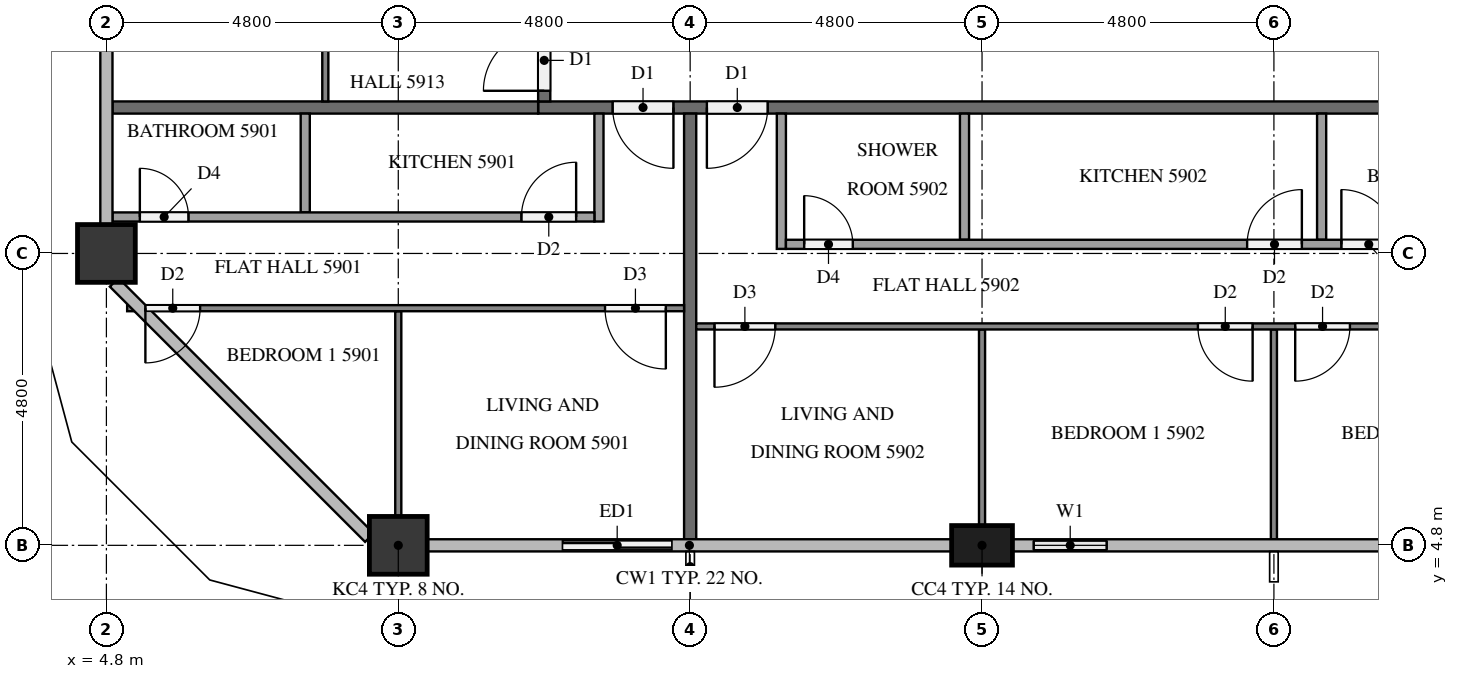
"""IFC4 building model, lengths in metres.
Left out: names, types, materials, properties, quantities, classifications, styles, units other than length and angle.
Written with IfcOpenShell. Run it as: python <this file> out.ifc"""

import sys

from ifc_helpers import new_model, si_unit, direction, frame, frame_2d, origin, origin_2d, place, context, subcontext, project, spatial, rectangle, extrude, element, fill, save


model = new_model("IFC4")
c1 = context("Model", 3, precision=1e-05, world=origin(), true_north=direction((0.0, 1.0)))
c2 = subcontext(c1, "Body", "Model", "MODEL_VIEW")
j1 = project(units=[si_unit("LENGTHUNIT", "METRE"), si_unit("PLANEANGLEUNIT", "RADIAN")], contexts=[c1])
p1 = place(None, origin())
s1 = spatial("IfcSite", under=j1, at=p1, CompositionType="ELEMENT")
p2 = place(p1, origin())
s2 = spatial("IfcBuilding", under=s1, at=p2, CompositionType="ELEMENT")
p3 = place(p2, frame((0.0, 0.0, 226.3)))
s3 = spatial("IfcBuildingStorey", under=s2, at=p3, CompositionType="ELEMENT", Elevation=226.3)
p4 = place(p3, frame((9.6, 4.8, 0.0), z_axis=(0.0, 0.0, 1.0), x_axis=(1.0, 0.0, 0.0)))
e1 = element("IfcColumn", 1, at=p4, inside=s3, PredefinedType="COLUMN", context=c2, shape_type="SweptSolid", body=[
    extrude(rectangle(XDim=0.95, YDim=0.95, at=origin_2d()), origin(), (0.0, 0.0, 1.0), 3.2),
])
p5 = place(p3, frame((19.2, 4.8, 0.0), z_axis=(0.0, 0.0, 1.0), x_axis=(1.0, 0.0, 0.0)))
e2 = element("IfcColumn", 2, at=p5, inside=s3, PredefinedType="COLUMN", context=c2, shape_type="SweptSolid", body=[
    extrude(rectangle(XDim=1.0, YDim=0.65, at=origin_2d()), origin(), (0.0, 0.0, 1.0), 3.2),
])
p6 = place(p3, frame((4.8, 9.6, 0.0), z_axis=(0.0, 0.0, 1.0), x_axis=(1.0, 0.0, 0.0)))
e3 = element("IfcColumn", 3, at=p6, inside=s3, PredefinedType="COLUMN", context=c2, shape_type="SweptSolid", body=[
    extrude(rectangle(XDim=0.95, YDim=0.95, at=origin_2d()), origin(), (0.0, 0.0, 1.0), 3.2),
])
p7 = place(p3, frame((12.0, 4.8, 0.0), z_axis=(0.0, 0.0, 1.0), x_axis=(1.0, 0.0, 0.0)))
e4 = element("IfcWall", 4, at=p7, inside=s3, PredefinedType="SOLIDWALL", context=c2, shape_type="SweptSolid", body=[
    extrude(rectangle(XDim=2.4, YDim=0.15, at=frame_2d((1.2, 0.0))), origin(), (0.0, 0.0, 1.0), 3.2),
])
p8 = place(p7, frame((0.3, 0.0, 0.0)))
e5 = element("IfcOpeningElement", 5, at=p8, cuts=e4, PredefinedType="OPENING", context=c2, shape_type="SweptSolid", body=[
    extrude(rectangle(XDim=1.8, YDim=2.4, at=frame_2d((0.9, 1.2))), frame((0.0, 0.085, 0.0), z_axis=(0.0, -1.0, 0.0), x_axis=(1.0, 0.0, 0.0)), (0.0, 0.0, 1.0), 0.17),
])
p9 = place(p3, frame((19.7, 4.8, 0.0), z_axis=(0.0, 0.0, 1.0), x_axis=(1.0, 0.0, 0.0)))
e6 = element("IfcWall", 6, at=p9, inside=s3, PredefinedType="SOLIDWALL", context=c2, shape_type="SweptSolid", body=[
    extrude(rectangle(XDim=1.9, YDim=0.15, at=frame_2d((0.95, 0.0))), origin(), (0.0, 0.0, 1.0), 3.2),
])
p10 = place(p9, frame((0.35, 0.0, 0.9)))
e7 = element("IfcOpeningElement", 7, at=p10, cuts=e6, PredefinedType="OPENING", context=c2, shape_type="SweptSolid", body=[
    extrude(rectangle(XDim=1.2, YDim=1.4, at=frame_2d((0.6, 0.7))), frame((0.0, 0.085, 0.0), z_axis=(0.0, -1.0, 0.0), x_axis=(1.0, 0.0, 0.0)), (0.0, 0.0, 1.0), 0.17),
])
p11 = place(p3, frame((50.5, 12.0, 0.0), z_axis=(0.0, 0.0, 1.0), x_axis=(-1.0, 0.0, 0.0)))
e8 = element("IfcWall", 8, at=p11, inside=s3, PredefinedType="PARTITIONING", context=c2, shape_type="SweptSolid", body=[
    extrude(rectangle(XDim=38.6, YDim=0.2, at=frame_2d((19.3, 0.0))), origin(), (0.0, 0.0, 1.0), 3.2),
])
p12 = place(p11, frame((36.375, 0.0, 0.0)))
e9 = element("IfcOpeningElement", 9, at=p12, cuts=e8, PredefinedType="OPENING", context=c2, shape_type="SweptSolid", body=[
    extrude(rectangle(XDim=1.0, YDim=2.1, at=frame_2d((0.5, 1.05))), frame((0.0, 0.11, 0.0), z_axis=(0.0, -1.0, 0.0), x_axis=(1.0, 0.0, 0.0)), (0.0, 0.0, 1.0), 0.22),
])
p13 = place(p11, frame((34.825, 0.0, 0.0)))
e10 = element("IfcOpeningElement", 10, at=p13, cuts=e8, PredefinedType="OPENING", context=c2, shape_type="SweptSolid", body=[
    extrude(rectangle(XDim=1.0, YDim=2.1, at=frame_2d((0.5, 1.05))), frame((0.0, 0.11, 0.0), z_axis=(0.0, -1.0, 0.0), x_axis=(1.0, 0.0, 0.0)), (0.0, 0.0, 1.0), 0.22),
])
p14 = place(p11, frame((20.375, 0.0, 0.0)))
e11 = element("IfcOpeningElement", 11, at=p14, cuts=e8, PredefinedType="OPENING", context=c2, shape_type="SweptSolid", body=[
    extrude(rectangle(XDim=1.1, YDim=2.1, at=frame_2d((0.55, 1.05))), frame((0.0, 0.11, 0.0), z_axis=(0.0, -1.0, 0.0), x_axis=(1.0, 0.0, 0.0)), (0.0, 0.0, 1.0), 0.22),
])
p15 = place(p11, frame((1.225, 0.0, 0.0)))
e12 = element("IfcOpeningElement", 12, at=p15, cuts=e8, PredefinedType="OPENING", context=c2, shape_type="SweptSolid", body=[
    extrude(rectangle(XDim=1.0, YDim=2.1, at=frame_2d((0.5, 1.05))), frame((0.0, 0.11, 0.0), z_axis=(0.0, -1.0, 0.0), x_axis=(1.0, 0.0, 0.0)), (0.0, 0.0, 1.0), 0.22),
])
p16 = place(p3, frame((12.0, 12.1, 0.0), z_axis=(0.0, 0.0, 1.0), x_axis=(0.0, 1.0, 0.0)))
e13 = element("IfcWall", 13, at=p16, inside=s3, PredefinedType="PARTITIONING", context=c2, shape_type="SweptSolid", body=[
    extrude(rectangle(XDim=28.6, YDim=0.2, at=frame_2d((14.3, 0.0))), origin(), (0.0, 0.0, 1.0), 3.2),
])
p17 = place(p16, frame((9.725, 0.0, 0.0)))
e14 = element("IfcOpeningElement", 14, at=p17, cuts=e13, PredefinedType="OPENING", context=c2, shape_type="SweptSolid", body=[
    extrude(rectangle(XDim=1.1, YDim=2.1, at=frame_2d((0.55, 1.05))), frame((0.0, 0.11, 0.0), z_axis=(0.0, -1.0, 0.0), x_axis=(1.0, 0.0, 0.0)), (0.0, 0.0, 1.0), 0.22),
])
p18 = place(p16, frame((0.175, 0.0, 0.0)))
e15 = element("IfcOpeningElement", 15, at=p18, cuts=e13, PredefinedType="OPENING", context=c2, shape_type="SweptSolid", body=[
    extrude(rectangle(XDim=1.0, YDim=2.1, at=frame_2d((0.5, 1.05))), frame((0.0, 0.11, 0.0), z_axis=(0.0, -1.0, 0.0), x_axis=(1.0, 0.0, 0.0)), (0.0, 0.0, 1.0), 0.22),
])
for number, where, z_axis, x_axis in (
    (16, (14.4, 11.9, 0.0), (0.0, 0.0, 1.0), (0.0, -1.0, 0.0)),
    (17, (4.9, 12.0, 0.0), (0.0, 0.0, 1.0), (1.0, 0.0, 0.0)),
):
    element("IfcWall", number, at=place(p3, frame(where, z_axis=z_axis, x_axis=x_axis)), inside=s3, PredefinedType="PARTITIONING", context=c2, shape_type="SweptSolid", body=[
        extrude(rectangle(XDim=7.0, YDim=0.2, at=frame_2d((3.5, 0.0))), origin(), (0.0, 0.0, 1.0), 3.2),
    ])
p19 = place(p3, frame((9.6, 8.65, 0.0), z_axis=(0.0, 0.0, 1.0), x_axis=(0.0, -1.0, 0.0)))
e18 = element("IfcWall", 18, at=p19, inside=s3, PredefinedType="PARTITIONING", context=c2, shape_type="SweptSolid", body=[
    extrude(rectangle(XDim=3.375, YDim=0.1, at=frame_2d((1.688, 0.0))), origin(), (0.0, 0.0, 1.0), 3.2),
])
p20 = place(p3, frame((14.3, 8.7, 0.0), z_axis=(0.0, 0.0, 1.0), x_axis=(-1.0, 0.0, 0.0)))
e19 = element("IfcWall", 19, at=p20, inside=s3, PredefinedType="PARTITIONING", context=c2, shape_type="SweptSolid", body=[
    extrude(rectangle(XDim=9.159, YDim=0.1, at=frame_2d((4.58, 0.0))), origin(), (0.0, 0.0, 1.0), 3.2),
])
p21 = place(p20, frame((0.3, 0.0, 0.0)))
e20 = element("IfcOpeningElement", 20, at=p21, cuts=e19, PredefinedType="OPENING", context=c2, shape_type="SweptSolid", body=[
    extrude(rectangle(XDim=1.0, YDim=2.1, at=frame_2d((0.5, 1.05))), frame((0.0, 0.06, 0.0), z_axis=(0.0, -1.0, 0.0), x_axis=(1.0, 0.0, 0.0)), (0.0, 0.0, 1.0), 0.12),
])
p22 = place(p20, frame((7.959, 0.0, 0.0)))
e21 = element("IfcOpeningElement", 21, at=p22, cuts=e19, PredefinedType="OPENING", context=c2, shape_type="SweptSolid", body=[
    extrude(rectangle(XDim=0.9, YDim=2.1, at=frame_2d((0.45, 1.05))), frame((0.0, 0.06, 0.0), z_axis=(0.0, -1.0, 0.0), x_axis=(1.0, 0.0, 0.0)), (0.0, 0.0, 1.0), 0.12),
])
p23 = place(p3, frame((8.07, 11.9, 0.0), z_axis=(0.0, 0.0, 1.0), x_axis=(0.0, -1.0, 0.0)))
e22 = element("IfcWall", 22, at=p23, inside=s3, PredefinedType="PARTITIONING", context=c2, shape_type="SweptSolid", body=[
    extrude(rectangle(XDim=1.625, YDim=0.15, at=frame_2d((0.812, 0.0))), origin(), (0.0, 0.0, 1.0), 3.2),
])
p24 = place(p3, frame((12.9, 11.9, 0.0), z_axis=(0.0, 0.0, 1.0), x_axis=(0.0, -1.0, 0.0)))
e23 = element("IfcWall", 23, at=p24, inside=s3, PredefinedType="PARTITIONING", context=c2, shape_type="SweptSolid", body=[
    extrude(rectangle(XDim=1.775, YDim=0.15, at=frame_2d((0.887, 0.0))), origin(), (0.0, 0.0, 1.0), 3.2),
])
p25 = place(p3, frame((4.9, 10.2, 0.0), z_axis=(0.0, 0.0, 1.0), x_axis=(1.0, 0.0, 0.0)))
e24 = element("IfcWall", 24, at=p25, inside=s3, PredefinedType="PARTITIONING", context=c2, shape_type="SweptSolid", body=[
    extrude(rectangle(XDim=7.925, YDim=0.15, at=frame_2d((3.962, 0.0))), origin(), (0.0, 0.0, 1.0), 3.2),
])
p26 = place(p25, frame((6.725, 0.0, 0.0)))
e25 = element("IfcOpeningElement", 25, at=p26, cuts=e24, PredefinedType="OPENING", context=c2, shape_type="SweptSolid", body=[
    extrude(rectangle(XDim=0.9, YDim=2.1, at=frame_2d((0.45, 1.05))), frame((0.0, 0.085, 0.0), z_axis=(0.0, -1.0, 0.0), x_axis=(1.0, 0.0, 0.0)), (0.0, 0.0, 1.0), 0.17),
])
p27 = place(p25, frame((0.45, 0.0, 0.0)))
e26 = element("IfcOpeningElement", 26, at=p27, cuts=e24, PredefinedType="OPENING", context=c2, shape_type="SweptSolid", body=[
    extrude(rectangle(XDim=0.8, YDim=2.1, at=frame_2d((0.4, 1.05))), frame((0.0, 0.085, 0.0), z_axis=(0.0, -1.0, 0.0), x_axis=(1.0, 0.0, 0.0)), (0.0, 0.0, 1.0), 0.17),
])
p28 = place(p3, frame((19.2, 8.35, 0.0), z_axis=(0.0, 0.0, 1.0), x_axis=(0.0, -1.0, 0.0)))
e27 = element("IfcWall", 27, at=p28, inside=s3, PredefinedType="PARTITIONING", context=c2, shape_type="SweptSolid", body=[
    extrude(rectangle(XDim=3.225, YDim=0.1, at=frame_2d((1.613, 0.0))), origin(), (0.0, 0.0, 1.0), 3.2),
])
p29 = place(p3, frame((24.0, 8.35, 0.0), z_axis=(0.0, 0.0, 1.0), x_axis=(0.0, -1.0, 0.0)))
e28 = element("IfcWall", 28, at=p29, inside=s3, PredefinedType="PARTITIONING", context=c2, shape_type="SweptSolid", body=[
    extrude(rectangle(XDim=3.45, YDim=0.1, at=frame_2d((1.725, 0.0))), origin(), (0.0, 0.0, 1.0), 3.2),
])
p30 = place(p3, frame((28.7, 8.4, 0.0), z_axis=(0.0, 0.0, 1.0), x_axis=(-1.0, 0.0, 0.0)))
e29 = element("IfcWall", 29, at=p30, inside=s3, PredefinedType="PARTITIONING", context=c2, shape_type="SweptSolid", body=[
    extrude(rectangle(XDim=14.2, YDim=0.1, at=frame_2d((7.1, 0.0))), origin(), (0.0, 0.0, 1.0), 3.2),
])
p31 = place(p30, frame((12.9, 0.0, 0.0)))
e30 = element("IfcOpeningElement", 30, at=p31, cuts=e29, PredefinedType="OPENING", context=c2, shape_type="SweptSolid", body=[
    extrude(rectangle(XDim=1.0, YDim=2.1, at=frame_2d((0.5, 1.05))), frame((0.0, 0.06, 0.0), z_axis=(0.0, -1.0, 0.0), x_axis=(1.0, 0.0, 0.0)), (0.0, 0.0, 1.0), 0.12),
])
p32 = place(p30, frame((5.05, 0.0, 0.0)))
e31 = element("IfcOpeningElement", 31, at=p32, cuts=e29, PredefinedType="OPENING", context=c2, shape_type="SweptSolid", body=[
    extrude(rectangle(XDim=0.9, YDim=2.1, at=frame_2d((0.45, 1.05))), frame((0.0, 0.06, 0.0), z_axis=(0.0, -1.0, 0.0), x_axis=(1.0, 0.0, 0.0)), (0.0, 0.0, 1.0), 0.12),
])
p33 = place(p30, frame((3.45, 0.0, 0.0)))
e32 = element("IfcOpeningElement", 32, at=p33, cuts=e29, PredefinedType="OPENING", context=c2, shape_type="SweptSolid", body=[
    extrude(rectangle(XDim=0.9, YDim=2.1, at=frame_2d((0.45, 1.05))), frame((0.0, 0.06, 0.0), z_axis=(0.0, -1.0, 0.0), x_axis=(1.0, 0.0, 0.0)), (0.0, 0.0, 1.0), 0.12),
])
for number, where, z_axis, x_axis in (
    (33, (18.912, 11.9, 0.0), (0.0, 0.0, 1.0), (0.0, -1.0, 0.0)),
    (34, (24.785, 11.9, 0.0), (0.0, 0.0, 1.0), (0.0, -1.0, 0.0)),
):
    element("IfcWall", number, at=place(p3, frame(where, z_axis=z_axis, x_axis=x_axis)), inside=s3, PredefinedType="PARTITIONING", context=c2, shape_type="SweptSolid", body=[
        extrude(rectangle(XDim=2.075, YDim=0.15, at=frame_2d((1.038, 0.0))), origin(), (0.0, 0.0, 1.0), 3.2),
    ])
p34 = place(p3, frame((15.9, 11.9, 0.0), z_axis=(0.0, 0.0, 1.0), x_axis=(0.0, -1.0, 0.0)))
e35 = element("IfcWall", 35, at=p34, inside=s3, PredefinedType="PARTITIONING", context=c2, shape_type="SweptSolid", body=[
    extrude(rectangle(XDim=2.225, YDim=0.15, at=frame_2d((1.112, 0.0))), origin(), (0.0, 0.0, 1.0), 3.2),
])
p35 = place(p3, frame((15.975, 9.75, 0.0), z_axis=(0.0, 0.0, 1.0), x_axis=(1.0, 0.0, 0.0)))
e36 = element("IfcWall", 36, at=p35, inside=s3, PredefinedType="PARTITIONING", context=c2, shape_type="SweptSolid", body=[
    extrude(rectangle(XDim=12.725, YDim=0.15, at=frame_2d((6.362, 0.0))), origin(), (0.0, 0.0, 1.0), 3.2),
])
p36 = place(p35, frame((0.3, 0.0, 0.0)))
e37 = element("IfcOpeningElement", 37, at=p36, cuts=e36, PredefinedType="OPENING", context=c2, shape_type="SweptSolid", body=[
    extrude(rectangle(XDim=0.8, YDim=2.1, at=frame_2d((0.4, 1.05))), frame((0.0, 0.085, 0.0), z_axis=(0.0, -1.0, 0.0), x_axis=(1.0, 0.0, 0.0)), (0.0, 0.0, 1.0), 0.17),
])
p37 = place(p35, frame((7.585, 0.0, 0.0)))
e38 = element("IfcOpeningElement", 38, at=p37, cuts=e36, PredefinedType="OPENING", context=c2, shape_type="SweptSolid", body=[
    extrude(rectangle(XDim=0.9, YDim=2.1, at=frame_2d((0.45, 1.05))), frame((0.0, 0.085, 0.0), z_axis=(0.0, -1.0, 0.0), x_axis=(1.0, 0.0, 0.0)), (0.0, 0.0, 1.0), 0.17),
])
p38 = place(p35, frame((9.135, 0.0, 0.0)))
e39 = element("IfcOpeningElement", 39, at=p38, cuts=e36, PredefinedType="OPENING", context=c2, shape_type="SweptSolid", body=[
    extrude(rectangle(XDim=0.9, YDim=2.1, at=frame_2d((0.45, 1.05))), frame((0.0, 0.085, 0.0), z_axis=(0.0, -1.0, 0.0), x_axis=(1.0, 0.0, 0.0)), (0.0, 0.0, 1.0), 0.17),
])
p39 = place(p3, frame((8.4, 12.1, 0.0), z_axis=(0.0, 0.0, 1.0), x_axis=(0.0, 1.0, 0.0)))
e40 = element("IfcWall", 40, at=p39, inside=s3, PredefinedType="PARTITIONING", context=c2, shape_type="SweptSolid", body=[
    extrude(rectangle(XDim=9.4, YDim=0.1, at=frame_2d((4.7, 0.0))), origin(), (0.0, 0.0, 1.0), 3.2),
])
p40 = place(p39, frame((3.35, 0.0, 0.0)))
e41 = element("IfcOpeningElement", 41, at=p40, cuts=e40, PredefinedType="OPENING", context=c2, shape_type="SweptSolid", body=[
    extrude(rectangle(XDim=1.0, YDim=2.1, at=frame_2d((0.5, 1.05))), frame((0.0, 0.06, 0.0), z_axis=(0.0, -1.0, 0.0), x_axis=(1.0, 0.0, 0.0)), (0.0, 0.0, 1.0), 0.12),
])
p41 = place(p39, frame((5.05, 0.0, 0.0)))
e42 = element("IfcOpeningElement", 42, at=p41, cuts=e40, PredefinedType="OPENING", context=c2, shape_type="SweptSolid", body=[
    extrude(rectangle(XDim=0.9, YDim=2.1, at=frame_2d((0.45, 1.05))), frame((0.0, 0.06, 0.0), z_axis=(0.0, -1.0, 0.0), x_axis=(1.0, 0.0, 0.0)), (0.0, 0.0, 1.0), 0.12),
])
p42 = place(p8, origin())
e43 = element("IfcDoor", 43, at=p42, inside=s3, OperationType="SLIDING_TO_LEFT", PredefinedType="DOOR", context=c2, shape_type="SweptSolid", body=[
    extrude(rectangle(XDim=1.8, YDim=2.4, at=frame_2d((0.9, 1.2))), frame((0.0, 0.025, 0.0), z_axis=(0.0, -1.0, 0.0), x_axis=(1.0, 0.0, 0.0)), (0.0, 0.0, 1.0), 0.05),
])
fill(e5, e43)
p43 = place(p10, origin())
e44 = element("IfcWindow", 44, at=p43, inside=s3, PartitioningType="SINGLE_PANEL", PredefinedType="WINDOW", context=c2, shape_type="SweptSolid", body=[
    extrude(rectangle(XDim=1.2, YDim=1.4, at=frame_2d((0.6, 0.7))), frame((0.0, 0.03, 0.0), z_axis=(0.0, -1.0, 0.0), x_axis=(1.0, 0.0, 0.0)), (0.0, 0.0, 1.0), 0.06),
])
fill(e7, e44)
p44 = place(p12, origin())
e45 = element("IfcDoor", 45, at=p44, inside=s3, OperationType="SINGLE_SWING_LEFT", PredefinedType="DOOR", context=c2, shape_type="SweptSolid", body=[
    extrude(rectangle(XDim=1.0, YDim=2.1, at=frame_2d((0.5, 1.05))), frame((0.0, 0.025, 0.0), z_axis=(0.0, -1.0, 0.0), x_axis=(1.0, 0.0, 0.0)), (0.0, 0.0, 1.0), 0.05),
])
fill(e9, e45)
p45 = place(p13, origin())
e46 = element("IfcDoor", 46, at=p45, inside=s3, OperationType="SINGLE_SWING_RIGHT", PredefinedType="DOOR", context=c2, shape_type="SweptSolid", body=[
    extrude(rectangle(XDim=1.0, YDim=2.1, at=frame_2d((0.5, 1.05))), frame((0.0, 0.025, 0.0), z_axis=(0.0, -1.0, 0.0), x_axis=(1.0, 0.0, 0.0)), (0.0, 0.0, 1.0), 0.05),
])
fill(e10, e46)
p46 = place(p18, origin())
e47 = element("IfcDoor", 47, at=p46, inside=s3, OperationType="SINGLE_SWING_LEFT", PredefinedType="DOOR", context=c2, shape_type="SweptSolid", body=[
    extrude(rectangle(XDim=1.0, YDim=2.1, at=frame_2d((0.5, 1.05))), frame((0.0, 0.025, 0.0), z_axis=(0.0, -1.0, 0.0), x_axis=(1.0, 0.0, 0.0)), (0.0, 0.0, 1.0), 0.05),
])
fill(e15, e47)
p47 = place(p21, origin())
e48 = element("IfcDoor", 48, at=p47, inside=s3, OperationType="SINGLE_SWING_LEFT", PredefinedType="DOOR", context=c2, shape_type="SweptSolid", body=[
    extrude(rectangle(XDim=1.0, YDim=2.1, at=frame_2d((0.5, 1.05))), frame((0.0, 0.025, 0.0), z_axis=(0.0, -1.0, 0.0), x_axis=(1.0, 0.0, 0.0)), (0.0, 0.0, 1.0), 0.05),
])
fill(e20, e48)
p48 = place(p22, origin())
e49 = element("IfcDoor", 49, at=p48, inside=s3, OperationType="SINGLE_SWING_RIGHT", PredefinedType="DOOR", context=c2, shape_type="SweptSolid", body=[
    extrude(rectangle(XDim=0.9, YDim=2.1, at=frame_2d((0.45, 1.05))), frame((0.0, 0.025, 0.0), z_axis=(0.0, -1.0, 0.0), x_axis=(1.0, 0.0, 0.0)), (0.0, 0.0, 1.0), 0.05),
])
fill(e21, e49)
p49 = place(p26, origin())
e50 = element("IfcDoor", 50, at=p49, inside=s3, OperationType="SINGLE_SWING_RIGHT", PredefinedType="DOOR", context=c2, shape_type="SweptSolid", body=[
    extrude(rectangle(XDim=0.9, YDim=2.1, at=frame_2d((0.45, 1.05))), frame((0.0, 0.025, 0.0), z_axis=(0.0, -1.0, 0.0), x_axis=(1.0, 0.0, 0.0)), (0.0, 0.0, 1.0), 0.05),
])
fill(e25, e50)
p50 = place(p27, origin())
e51 = element("IfcDoor", 51, at=p50, inside=s3, OperationType="SINGLE_SWING_LEFT", PredefinedType="DOOR", context=c2, shape_type="SweptSolid", body=[
    extrude(rectangle(XDim=0.8, YDim=2.1, at=frame_2d((0.4, 1.05))), frame((0.0, 0.025, 0.0), z_axis=(0.0, -1.0, 0.0), x_axis=(1.0, 0.0, 0.0)), (0.0, 0.0, 1.0), 0.05),
])
fill(e26, e51)
p51 = place(p31, origin())
e52 = element("IfcDoor", 52, at=p51, inside=s3, OperationType="SINGLE_SWING_RIGHT", PredefinedType="DOOR", context=c2, shape_type="SweptSolid", body=[
    extrude(rectangle(XDim=1.0, YDim=2.1, at=frame_2d((0.5, 1.05))), frame((0.0, 0.025, 0.0), z_axis=(0.0, -1.0, 0.0), x_axis=(1.0, 0.0, 0.0)), (0.0, 0.0, 1.0), 0.05),
])
fill(e30, e52)
p52 = place(p32, origin())
e53 = element("IfcDoor", 53, at=p52, inside=s3, OperationType="SINGLE_SWING_LEFT", PredefinedType="DOOR", context=c2, shape_type="SweptSolid", body=[
    extrude(rectangle(XDim=0.9, YDim=2.1, at=frame_2d((0.45, 1.05))), frame((0.0, 0.025, 0.0), z_axis=(0.0, -1.0, 0.0), x_axis=(1.0, 0.0, 0.0)), (0.0, 0.0, 1.0), 0.05),
])
fill(e31, e53)
p53 = place(p33, origin())
e54 = element("IfcDoor", 54, at=p53, inside=s3, OperationType="SINGLE_SWING_RIGHT", PredefinedType="DOOR", context=c2, shape_type="SweptSolid", body=[
    extrude(rectangle(XDim=0.9, YDim=2.1, at=frame_2d((0.45, 1.05))), frame((0.0, 0.025, 0.0), z_axis=(0.0, -1.0, 0.0), x_axis=(1.0, 0.0, 0.0)), (0.0, 0.0, 1.0), 0.05),
])
fill(e32, e54)
p54 = place(p36, origin())
e55 = element("IfcDoor", 55, at=p54, inside=s3, OperationType="SINGLE_SWING_LEFT", PredefinedType="DOOR", context=c2, shape_type="SweptSolid", body=[
    extrude(rectangle(XDim=0.8, YDim=2.1, at=frame_2d((0.4, 1.05))), frame((0.0, 0.025, 0.0), z_axis=(0.0, -1.0, 0.0), x_axis=(1.0, 0.0, 0.0)), (0.0, 0.0, 1.0), 0.05),
])
fill(e37, e55)
p55 = place(p37, origin())
e56 = element("IfcDoor", 56, at=p55, inside=s3, OperationType="SINGLE_SWING_RIGHT", PredefinedType="DOOR", context=c2, shape_type="SweptSolid", body=[
    extrude(rectangle(XDim=0.9, YDim=2.1, at=frame_2d((0.45, 1.05))), frame((0.0, 0.025, 0.0), z_axis=(0.0, -1.0, 0.0), x_axis=(1.0, 0.0, 0.0)), (0.0, 0.0, 1.0), 0.05),
])
fill(e38, e56)
p56 = place(p38, origin())
e57 = element("IfcDoor", 57, at=p56, inside=s3, OperationType="SINGLE_SWING_LEFT", PredefinedType="DOOR", context=c2, shape_type="SweptSolid", body=[
    extrude(rectangle(XDim=0.9, YDim=2.1, at=frame_2d((0.45, 1.05))), frame((0.0, 0.025, 0.0), z_axis=(0.0, -1.0, 0.0), x_axis=(1.0, 0.0, 0.0)), (0.0, 0.0, 1.0), 0.05),
])
fill(e39, e57)
save(model, sys.argv[1])
